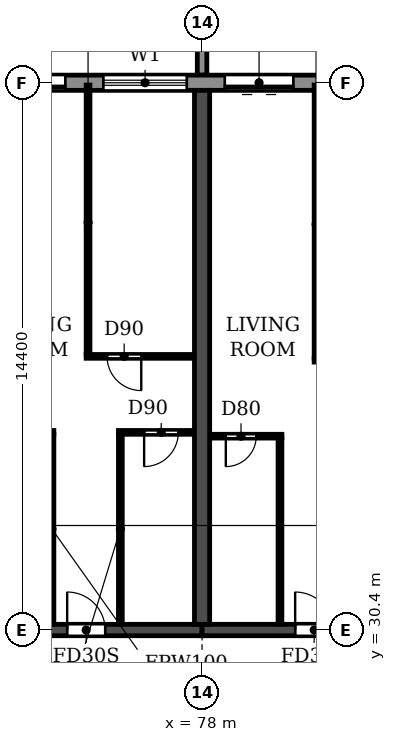
"""IFC4 building model, lengths in metres.
Left out: names, types, materials, properties, quantities, classifications, styles, units other than length and angle.
Written with IfcOpenShell. Run it as: python <this file> out.ifc"""

import sys

from ifc_helpers import new_model, si_unit, direction, frame, frame_2d, origin, place, context, subcontext, project, spatial, polyline, rectangle, outline, extrude, source, transform, mapped, element, fill, save


model = new_model("IFC4")
c1 = context("Model", 3, precision=1e-05, world=origin(), true_north=direction((0.0, 1.0)))
c2 = subcontext(c1, "Body", "Model", "MODEL_VIEW")
j1 = project(units=[si_unit("LENGTHUNIT", "METRE"), si_unit("PLANEANGLEUNIT", "RADIAN")], contexts=[c1])
p1 = place(None, origin())
s1 = spatial("IfcSite", under=j1, at=p1, CompositionType="ELEMENT")
p2 = place(p1, origin())
s2 = spatial("IfcBuilding", under=s1, at=p2, CompositionType="ELEMENT")
p3 = place(p2, frame((0.0, 0.0, 56.4)))
s3 = spatial("IfcBuildingStorey", under=s2, at=p3, CompositionType="ELEMENT", Elevation=56.4)
p4 = place(p3, frame((78.0, 30.55, 0.0), z_axis=(0.0, 0.0, 1.0), x_axis=(0.0, 1.0, 0.0)))
e1 = element("IfcWall", 1, at=p4, inside=s3, PredefinedType="SHEAR", context=c2, shape_type="SweptSolid", body=[
    extrude(rectangle(XDim=14.05, YDim=0.4, at=frame_2d((7.025, 0.0))), origin(), (0.0, 0.0, 1.0), 3.05),
])
p5 = place(p3, frame((72.0, 30.4, 0.0), z_axis=(0.0, 0.0, 1.0), x_axis=(1.0, 0.0, 0.0)))
e2 = element("IfcWall", 2, at=p5, inside=s3, PredefinedType="SHEAR", context=c2, shape_type="SweptSolid", body=[
    extrude(rectangle(XDim=6.0, YDim=0.3, at=frame_2d((3.0, 0.0))), origin(), (0.0, 0.0, 1.0), 2.45),
])
p6 = place(p5, frame((2.45, 0.0, 0.0)))
e3 = element("IfcOpeningElement", 3, at=p6, cuts=e2, PredefinedType="OPENING", context=c2, shape_type="SweptSolid", body=[
    extrude(rectangle(XDim=1.0, YDim=2.1, at=frame_2d((0.5, 1.05))), frame((0.0, 0.16, 0.0), z_axis=(0.0, -1.0, 0.0), x_axis=(1.0, 0.0, 0.0)), (0.0, 0.0, 1.0), 0.32),
])
p7 = place(p3, frame((78.0, 30.4, 0.0), z_axis=(0.0, 0.0, 1.0), x_axis=(1.0, 0.0, 0.0)))
e4 = element("IfcWall", 4, at=p7, inside=s3, PredefinedType="SHEAR", context=c2, shape_type="SweptSolid", body=[
    extrude(rectangle(XDim=6.0, YDim=0.3, at=frame_2d((3.0, 0.0))), origin(), (0.0, 0.0, 1.0), 2.45),
])
p8 = place(p7, frame((2.45, 0.0, 0.0)))
e5 = element("IfcOpeningElement", 5, at=p8, cuts=e4, PredefinedType="OPENING", context=c2, shape_type="SweptSolid", body=[
    extrude(rectangle(XDim=1.0, YDim=2.1, at=frame_2d((0.5, 1.05))), frame((0.0, 0.16, 0.0), z_axis=(0.0, -1.0, 0.0), x_axis=(1.0, 0.0, 0.0)), (0.0, 0.0, 1.0), 0.32),
])
p9 = place(p3, frame((91.317, 44.8, 0.0), z_axis=(0.0, 0.0, 1.0), x_axis=(-1.0, 0.0, 0.0)))
e6 = element("IfcWall", 6, at=p9, inside=s3, PredefinedType="STANDARD", context=c2, shape_type="SweptSolid", body=[
    extrude(rectangle(XDim=80.634, YDim=0.4, at=frame_2d((40.317, 0.0))), origin(), (0.0, 0.0, 1.0), 3.05),
])
p10 = place(p9, frame((76.717, 0.0, 0.9)))
e7 = element("IfcOpeningElement", 7, at=p10, cuts=e6, PredefinedType="OPENING", context=c2, shape_type="SweptSolid", body=[
    extrude(rectangle(XDim=2.2, YDim=1.5, at=frame_2d((1.1, 0.75))), frame((0.0, 0.21, 0.0), z_axis=(0.0, -1.0, 0.0), x_axis=(1.0, 0.0, 0.0)), (0.0, 0.0, 1.0), 0.42),
])
p11 = place(p9, frame((73.917, 0.0, 0.0)))
e8 = element("IfcOpeningElement", 8, at=p11, cuts=e6, PredefinedType="OPENING", context=c2, shape_type="SweptSolid", body=[
    extrude(rectangle(XDim=1.8, YDim=2.4, at=frame_2d((0.9, 1.2))), frame((0.0, 0.21, 0.0), z_axis=(0.0, -1.0, 0.0), x_axis=(1.0, 0.0, 0.0)), (0.0, 0.0, 1.0), 0.42),
])
p12 = place(p9, frame((70.717, 0.0, 0.9)))
e9 = element("IfcOpeningElement", 9, at=p12, cuts=e6, PredefinedType="OPENING", context=c2, shape_type="SweptSolid", body=[
    extrude(rectangle(XDim=2.2, YDim=1.5, at=frame_2d((1.1, 0.75))), frame((0.0, 0.21, 0.0), z_axis=(0.0, -1.0, 0.0), x_axis=(1.0, 0.0, 0.0)), (0.0, 0.0, 1.0), 0.42),
])
p13 = place(p9, frame((67.917, 0.0, 0.0)))
e10 = element("IfcOpeningElement", 10, at=p13, cuts=e6, PredefinedType="OPENING", context=c2, shape_type="SweptSolid", body=[
    extrude(rectangle(XDim=1.8, YDim=2.4, at=frame_2d((0.9, 1.2))), frame((0.0, 0.21, 0.0), z_axis=(0.0, -1.0, 0.0), x_axis=(1.0, 0.0, 0.0)), (0.0, 0.0, 1.0), 0.42),
])
p14 = place(p9, frame((64.717, 0.0, 0.9)))
e11 = element("IfcOpeningElement", 11, at=p14, cuts=e6, PredefinedType="OPENING", context=c2, shape_type="SweptSolid", body=[
    extrude(rectangle(XDim=2.2, YDim=1.5, at=frame_2d((1.1, 0.75))), frame((0.0, 0.21, 0.0), z_axis=(0.0, -1.0, 0.0), x_axis=(1.0, 0.0, 0.0)), (0.0, 0.0, 1.0), 0.42),
])
p15 = place(p9, frame((61.917, 0.0, 0.0)))
e12 = element("IfcOpeningElement", 12, at=p15, cuts=e6, PredefinedType="OPENING", context=c2, shape_type="SweptSolid", body=[
    extrude(rectangle(XDim=1.8, YDim=2.4, at=frame_2d((0.9, 1.2))), frame((0.0, 0.21, 0.0), z_axis=(0.0, -1.0, 0.0), x_axis=(1.0, 0.0, 0.0)), (0.0, 0.0, 1.0), 0.42),
])
p16 = place(p9, frame((58.717, 0.0, 0.9)))
e13 = element("IfcOpeningElement", 13, at=p16, cuts=e6, PredefinedType="OPENING", context=c2, shape_type="SweptSolid", body=[
    extrude(rectangle(XDim=2.2, YDim=1.5, at=frame_2d((1.1, 0.75))), frame((0.0, 0.21, 0.0), z_axis=(0.0, -1.0, 0.0), x_axis=(1.0, 0.0, 0.0)), (0.0, 0.0, 1.0), 0.42),
])
p17 = place(p9, frame((55.717, 0.0, 0.9)))
e14 = element("IfcOpeningElement", 14, at=p17, cuts=e6, PredefinedType="OPENING", context=c2, shape_type="SweptSolid", body=[
    extrude(rectangle(XDim=2.2, YDim=1.5, at=frame_2d((1.1, 0.75))), frame((0.0, 0.21, 0.0), z_axis=(0.0, -1.0, 0.0), x_axis=(1.0, 0.0, 0.0)), (0.0, 0.0, 1.0), 0.42),
])
p18 = place(p9, frame((52.917, 0.0, 0.0)))
e15 = element("IfcOpeningElement", 15, at=p18, cuts=e6, PredefinedType="OPENING", context=c2, shape_type="SweptSolid", body=[
    extrude(rectangle(XDim=1.8, YDim=2.4, at=frame_2d((0.9, 1.2))), frame((0.0, 0.21, 0.0), z_axis=(0.0, -1.0, 0.0), x_axis=(1.0, 0.0, 0.0)), (0.0, 0.0, 1.0), 0.42),
])
p19 = place(p9, frame((49.717, 0.0, 0.9)))
e16 = element("IfcOpeningElement", 16, at=p19, cuts=e6, PredefinedType="OPENING", context=c2, shape_type="SweptSolid", body=[
    extrude(rectangle(XDim=2.2, YDim=1.5, at=frame_2d((1.1, 0.75))), frame((0.0, 0.21, 0.0), z_axis=(0.0, -1.0, 0.0), x_axis=(1.0, 0.0, 0.0)), (0.0, 0.0, 1.0), 0.42),
])
p20 = place(p9, frame((46.917, 0.0, 0.0)))
e17 = element("IfcOpeningElement", 17, at=p20, cuts=e6, PredefinedType="OPENING", context=c2, shape_type="SweptSolid", body=[
    extrude(rectangle(XDim=1.8, YDim=2.4, at=frame_2d((0.9, 1.2))), frame((0.0, 0.21, 0.0), z_axis=(0.0, -1.0, 0.0), x_axis=(1.0, 0.0, 0.0)), (0.0, 0.0, 1.0), 0.42),
])
p21 = place(p9, frame((43.717, 0.0, 0.9)))
e18 = element("IfcOpeningElement", 18, at=p21, cuts=e6, PredefinedType="OPENING", context=c2, shape_type="SweptSolid", body=[
    extrude(rectangle(XDim=2.2, YDim=1.5, at=frame_2d((1.1, 0.75))), frame((0.0, 0.21, 0.0), z_axis=(0.0, -1.0, 0.0), x_axis=(1.0, 0.0, 0.0)), (0.0, 0.0, 1.0), 0.42),
])
p22 = place(p9, frame((40.717, 0.0, 0.9)))
e19 = element("IfcOpeningElement", 19, at=p22, cuts=e6, PredefinedType="OPENING", context=c2, shape_type="SweptSolid", body=[
    extrude(rectangle(XDim=2.2, YDim=1.5, at=frame_2d((1.1, 0.75))), frame((0.0, 0.21, 0.0), z_axis=(0.0, -1.0, 0.0), x_axis=(1.0, 0.0, 0.0)), (0.0, 0.0, 1.0), 0.42),
])
p23 = place(p9, frame((37.717, 0.0, 0.9)))
e20 = element("IfcOpeningElement", 20, at=p23, cuts=e6, PredefinedType="OPENING", context=c2, shape_type="SweptSolid", body=[
    extrude(rectangle(XDim=2.2, YDim=1.5, at=frame_2d((1.1, 0.75))), frame((0.0, 0.21, 0.0), z_axis=(0.0, -1.0, 0.0), x_axis=(1.0, 0.0, 0.0)), (0.0, 0.0, 1.0), 0.42),
])
p24 = place(p9, frame((34.717, 0.0, 0.9)))
e21 = element("IfcOpeningElement", 21, at=p24, cuts=e6, PredefinedType="OPENING", context=c2, shape_type="SweptSolid", body=[
    extrude(rectangle(XDim=2.2, YDim=1.5, at=frame_2d((1.1, 0.75))), frame((0.0, 0.21, 0.0), z_axis=(0.0, -1.0, 0.0), x_axis=(1.0, 0.0, 0.0)), (0.0, 0.0, 1.0), 0.42),
])
p25 = place(p9, frame((31.917, 0.0, 0.0)))
e22 = element("IfcOpeningElement", 22, at=p25, cuts=e6, PredefinedType="OPENING", context=c2, shape_type="SweptSolid", body=[
    extrude(rectangle(XDim=1.8, YDim=2.4, at=frame_2d((0.9, 1.2))), frame((0.0, 0.21, 0.0), z_axis=(0.0, -1.0, 0.0), x_axis=(1.0, 0.0, 0.0)), (0.0, 0.0, 1.0), 0.42),
])
p26 = place(p9, frame((28.917, 0.0, 0.0)))
e23 = element("IfcOpeningElement", 23, at=p26, cuts=e6, PredefinedType="OPENING", context=c2, shape_type="SweptSolid", body=[
    extrude(rectangle(XDim=1.8, YDim=2.4, at=frame_2d((0.9, 1.2))), frame((0.0, 0.21, 0.0), z_axis=(0.0, -1.0, 0.0), x_axis=(1.0, 0.0, 0.0)), (0.0, 0.0, 1.0), 0.42),
])
p27 = place(p9, frame((25.717, 0.0, 0.9)))
e24 = element("IfcOpeningElement", 24, at=p27, cuts=e6, PredefinedType="OPENING", context=c2, shape_type="SweptSolid", body=[
    extrude(rectangle(XDim=2.2, YDim=1.5, at=frame_2d((1.1, 0.75))), frame((0.0, 0.21, 0.0), z_axis=(0.0, -1.0, 0.0), x_axis=(1.0, 0.0, 0.0)), (0.0, 0.0, 1.0), 0.42),
])
p28 = place(p9, frame((22.917, 0.0, 0.0)))
e25 = element("IfcOpeningElement", 25, at=p28, cuts=e6, PredefinedType="OPENING", context=c2, shape_type="SweptSolid", body=[
    extrude(rectangle(XDim=1.8, YDim=2.4, at=frame_2d((0.9, 1.2))), frame((0.0, 0.21, 0.0), z_axis=(0.0, -1.0, 0.0), x_axis=(1.0, 0.0, 0.0)), (0.0, 0.0, 1.0), 0.42),
])
p29 = place(p9, frame((19.717, 0.0, 0.9)))
e26 = element("IfcOpeningElement", 26, at=p29, cuts=e6, PredefinedType="OPENING", context=c2, shape_type="SweptSolid", body=[
    extrude(rectangle(XDim=2.2, YDim=1.5, at=frame_2d((1.1, 0.75))), frame((0.0, 0.21, 0.0), z_axis=(0.0, -1.0, 0.0), x_axis=(1.0, 0.0, 0.0)), (0.0, 0.0, 1.0), 0.42),
])
p30 = place(p9, frame((16.917, 0.0, 0.0)))
e27 = element("IfcOpeningElement", 27, at=p30, cuts=e6, PredefinedType="OPENING", context=c2, shape_type="SweptSolid", body=[
    extrude(rectangle(XDim=1.8, YDim=2.4, at=frame_2d((0.9, 1.2))), frame((0.0, 0.21, 0.0), z_axis=(0.0, -1.0, 0.0), x_axis=(1.0, 0.0, 0.0)), (0.0, 0.0, 1.0), 0.42),
])
p31 = place(p9, frame((13.717, 0.0, 0.9)))
e28 = element("IfcOpeningElement", 28, at=p31, cuts=e6, PredefinedType="OPENING", context=c2, shape_type="SweptSolid", body=[
    extrude(rectangle(XDim=2.2, YDim=1.5, at=frame_2d((1.1, 0.75))), frame((0.0, 0.21, 0.0), z_axis=(0.0, -1.0, 0.0), x_axis=(1.0, 0.0, 0.0)), (0.0, 0.0, 1.0), 0.42),
])
p32 = place(p9, frame((10.917, 0.0, 0.0)))
e29 = element("IfcOpeningElement", 29, at=p32, cuts=e6, PredefinedType="OPENING", context=c2, shape_type="SweptSolid", body=[
    extrude(rectangle(XDim=1.8, YDim=2.4, at=frame_2d((0.9, 1.2))), frame((0.0, 0.21, 0.0), z_axis=(0.0, -1.0, 0.0), x_axis=(1.0, 0.0, 0.0)), (0.0, 0.0, 1.0), 0.42),
])
p33 = place(p9, frame((7.717, 0.0, 0.9)))
e30 = element("IfcOpeningElement", 30, at=p33, cuts=e6, PredefinedType="OPENING", context=c2, shape_type="SweptSolid", body=[
    extrude(rectangle(XDim=2.2, YDim=1.5, at=frame_2d((1.1, 0.75))), frame((0.0, 0.21, 0.0), z_axis=(0.0, -1.0, 0.0), x_axis=(1.0, 0.0, 0.0)), (0.0, 0.0, 1.0), 0.42),
])
p34 = place(p9, frame((4.717, 0.0, 0.9)))
e31 = element("IfcOpeningElement", 31, at=p34, cuts=e6, PredefinedType="OPENING", context=c2, shape_type="SweptSolid", body=[
    extrude(rectangle(XDim=2.2, YDim=1.5, at=frame_2d((1.1, 0.75))), frame((0.0, 0.21, 0.0), z_axis=(0.0, -1.0, 0.0), x_axis=(1.0, 0.0, 0.0)), (0.0, 0.0, 1.0), 0.42),
])
p35 = place(p9, frame((1.717, 0.0, 0.9)))
e32 = element("IfcOpeningElement", 32, at=p35, cuts=e6, PredefinedType="OPENING", context=c2, shape_type="SweptSolid", body=[
    extrude(rectangle(XDim=2.2, YDim=1.5, at=frame_2d((1.1, 0.75))), frame((0.0, 0.21, 0.0), z_axis=(0.0, -1.0, 0.0), x_axis=(1.0, 0.0, 0.0)), (0.0, 0.0, 1.0), 0.42),
])
m1 = source(origin(), c2, "Body", "SweptSolid", [
    extrude(outline(polyline([(0.0, 0.0), (0.25, 0.0), (0.25, 3.1), (0.0, 3.1), (0.0, 0.0)])), origin(), (0.0, 0.0, 1.0), 3.1),
])
p36 = place(p3, frame((77.875, 45.0, 0.0)))
e33 = element("IfcWall", 33, at=p36, inside=s3, PredefinedType="STANDARD", context=c2, shape_type="MappedRepresentation", body=[
    mapped(m1, transform((0.0, 0.0, 0.0))),
])
p37 = place(p3, frame((78.21, 35.5, 0.0), z_axis=(0.0, 0.0, 1.0), x_axis=(1.0, 0.0, 0.0)))
e34 = element("IfcWall", 34, at=p37, inside=s3, PredefinedType="PARTITIONING", context=c2, shape_type="SweptSolid", body=[
    extrude(rectangle(XDim=1.89, YDim=0.1, at=frame_2d((0.945, 0.0))), origin(), (0.0, 0.0, 1.0), 3.05),
])
p38 = place(p37, frame((0.415, 0.0, 0.0)))
e35 = element("IfcOpeningElement", 35, at=p38, cuts=e34, PredefinedType="OPENING", context=c2, shape_type="SweptSolid", body=[
    extrude(rectangle(XDim=0.8, YDim=2.1, at=frame_2d((0.4, 1.05))), frame((0.0, 0.06, 0.0), z_axis=(0.0, -1.0, 0.0), x_axis=(1.0, 0.0, 0.0)), (0.0, 0.0, 1.0), 0.12),
])
p39 = place(p3, frame((72.21, 35.6, 0.0), z_axis=(0.0, 0.0, 1.0), x_axis=(1.0, 0.0, 0.0)))
e36 = element("IfcWall", 36, at=p39, inside=s3, PredefinedType="PARTITIONING", context=c2, shape_type="SweptSolid", body=[
    extrude(rectangle(XDim=1.89, YDim=0.1, at=frame_2d((0.945, 0.0))), origin(), (0.0, 0.0, 1.0), 3.05),
])
p40 = place(p39, frame((0.415, 0.0, 0.0)))
e37 = element("IfcOpeningElement", 37, at=p40, cuts=e36, PredefinedType="OPENING", context=c2, shape_type="SweptSolid", body=[
    extrude(rectangle(XDim=0.8, YDim=2.1, at=frame_2d((0.4, 1.05))), frame((0.0, 0.06, 0.0), z_axis=(0.0, -1.0, 0.0), x_axis=(1.0, 0.0, 0.0)), (0.0, 0.0, 1.0), 0.12),
])
p41 = place(p3, frame((75.8, 35.6, 0.0), z_axis=(0.0, 0.0, 1.0), x_axis=(1.0, 0.0, 0.0)))
e38 = element("IfcWall", 38, at=p41, inside=s3, PredefinedType="PARTITIONING", context=c2, shape_type="SweptSolid", body=[
    extrude(rectangle(XDim=1.99, YDim=0.1, at=frame_2d((0.995, 0.0))), origin(), (0.0, 0.0, 1.0), 3.05),
])
p42 = place(p41, frame((0.675, 0.0, 0.0)))
e39 = element("IfcOpeningElement", 39, at=p42, cuts=e38, PredefinedType="OPENING", context=c2, shape_type="SweptSolid", body=[
    extrude(rectangle(XDim=0.9, YDim=2.1, at=frame_2d((0.45, 1.05))), frame((0.0, 0.06, 0.0), z_axis=(0.0, -1.0, 0.0), x_axis=(1.0, 0.0, 0.0)), (0.0, 0.0, 1.0), 0.12),
])
p43 = place(p3, frame((80.95, 37.5, 0.0), z_axis=(0.0, 0.0, 1.0), x_axis=(1.0, 0.0, 0.0)))
e40 = element("IfcWall", 40, at=p43, inside=s3, PredefinedType="PARTITIONING", context=c2, shape_type="SweptSolid", body=[
    extrude(rectangle(XDim=2.84, YDim=0.1, at=frame_2d((1.42, 0.0))), origin(), (0.0, 0.0, 1.0), 3.05),
])
p44 = place(p43, frame((1.65, 0.0, 0.0)))
e41 = element("IfcOpeningElement", 41, at=p44, cuts=e40, PredefinedType="OPENING", context=c2, shape_type="SweptSolid", body=[
    extrude(rectangle(XDim=0.9, YDim=2.1, at=frame_2d((0.45, 1.05))), frame((0.0, 0.06, 0.0), z_axis=(0.0, -1.0, 0.0), x_axis=(1.0, 0.0, 0.0)), (0.0, 0.0, 1.0), 0.12),
])
p45 = place(p3, frame((74.95, 37.6, 0.0), z_axis=(0.0, 0.0, 1.0), x_axis=(1.0, 0.0, 0.0)))
e42 = element("IfcWall", 42, at=p45, inside=s3, PredefinedType="PARTITIONING", context=c2, shape_type="SweptSolid", body=[
    extrude(rectangle(XDim=2.84, YDim=0.1, at=frame_2d((1.42, 0.0))), origin(), (0.0, 0.0, 1.0), 3.05),
])
p46 = place(p45, frame((0.55, 0.0, 0.0)))
e43 = element("IfcOpeningElement", 43, at=p46, cuts=e42, PredefinedType="OPENING", context=c2, shape_type="SweptSolid", body=[
    extrude(rectangle(XDim=0.9, YDim=2.1, at=frame_2d((0.45, 1.05))), frame((0.0, 0.06, 0.0), z_axis=(0.0, -1.0, 0.0), x_axis=(1.0, 0.0, 0.0)), (0.0, 0.0, 1.0), 0.12),
])
p47 = place(p3, frame((74.05, 30.56, 0.0), z_axis=(0.0, 0.0, 1.0), x_axis=(0.0, 1.0, 0.0)))
e44 = element("IfcWall", 44, at=p47, inside=s3, PredefinedType="PARTITIONING", context=c2, shape_type="SweptSolid", body=[
    extrude(rectangle(XDim=4.99, YDim=0.1, at=frame_2d((2.495, 0.0))), origin(), (0.0, 0.0, 1.0), 3.05),
])
p48 = place(p3, frame((75.0, 37.65, 0.0), z_axis=(0.0, 0.0, 1.0), x_axis=(0.0, 1.0, 0.0)))
e45 = element("IfcWall", 45, at=p48, inside=s3, PredefinedType="PARTITIONING", context=c2, shape_type="SweptSolid", body=[
    extrude(rectangle(XDim=7.09, YDim=0.1, at=frame_2d((3.545, 0.0))), origin(), (0.0, 0.0, 1.0), 3.05),
])
p49 = place(p3, frame((75.85, 30.56, 0.0), z_axis=(0.0, 0.0, 1.0), x_axis=(0.0, 1.0, 0.0)))
e46 = element("IfcWall", 46, at=p49, inside=s3, PredefinedType="PARTITIONING", context=c2, shape_type="SweptSolid", body=[
    extrude(rectangle(XDim=4.99, YDim=0.1, at=frame_2d((2.495, 0.0))), origin(), (0.0, 0.0, 1.0), 3.05),
])
p50 = place(p3, frame((80.05, 30.56, 0.0), z_axis=(0.0, 0.0, 1.0), x_axis=(0.0, 1.0, 0.0)))
e47 = element("IfcWall", 47, at=p50, inside=s3, PredefinedType="PARTITIONING", context=c2, shape_type="SweptSolid", body=[
    extrude(rectangle(XDim=4.89, YDim=0.1, at=frame_2d((2.445, 0.0))), origin(), (0.0, 0.0, 1.0), 3.05),
])
p51 = place(p3, frame((81.0, 37.55, 0.0), z_axis=(0.0, 0.0, 1.0), x_axis=(0.0, 1.0, 0.0)))
e48 = element("IfcWall", 48, at=p51, inside=s3, PredefinedType="PARTITIONING", context=c2, shape_type="SweptSolid", body=[
    extrude(rectangle(XDim=7.19, YDim=0.1, at=frame_2d((3.595, 0.0))), origin(), (0.0, 0.0, 1.0), 3.05),
])
p52 = place(p30, origin())
e49 = element("IfcDoor", 49, at=p52, inside=s3, OperationType="DOUBLE_DOOR_SLIDING", PredefinedType="DOOR", context=c2, shape_type="SweptSolid", body=[
    extrude(rectangle(XDim=1.8, YDim=2.4, at=frame_2d((0.9, 1.2))), frame((0.0, 0.025, 0.0), z_axis=(0.0, -1.0, 0.0), x_axis=(1.0, 0.0, 0.0)), (0.0, 0.0, 1.0), 0.05),
])
fill(e27, e49)
p53 = place(p31, origin())
e50 = element("IfcWindow", 50, at=p53, inside=s3, PartitioningType="DOUBLE_PANEL_HORIZONTAL", PredefinedType="WINDOW", context=c2, shape_type="SweptSolid", body=[
    extrude(rectangle(XDim=2.2, YDim=1.5, at=frame_2d((1.1, 0.75))), frame((0.0, 0.03, 0.0), z_axis=(0.0, -1.0, 0.0), x_axis=(1.0, 0.0, 0.0)), (0.0, 0.0, 1.0), 0.06),
])
fill(e28, e50)
p54 = place(p32, origin())
e51 = element("IfcDoor", 51, at=p54, inside=s3, OperationType="DOUBLE_DOOR_SLIDING", PredefinedType="DOOR", context=c2, shape_type="SweptSolid", body=[
    extrude(rectangle(XDim=1.8, YDim=2.4, at=frame_2d((0.9, 1.2))), frame((0.0, 0.025, 0.0), z_axis=(0.0, -1.0, 0.0), x_axis=(1.0, 0.0, 0.0)), (0.0, 0.0, 1.0), 0.05),
])
fill(e29, e51)
p55 = place(p6, origin())
e52 = element("IfcDoor", 52, at=p55, inside=s3, OperationType="SINGLE_SWING_LEFT", PredefinedType="DOOR", context=c2, shape_type="SweptSolid", body=[
    extrude(rectangle(XDim=1.0, YDim=2.1, at=frame_2d((0.5, 1.05))), frame((0.0, 0.025, 0.0), z_axis=(0.0, -1.0, 0.0), x_axis=(1.0, 0.0, 0.0)), (0.0, 0.0, 1.0), 0.05),
])
fill(e3, e52)
p56 = place(p46, frame((0.9, 0.0, 0.0), z_axis=(0.0, 0.0, 1.0), x_axis=(-1.0, 0.0, 0.0)))
e53 = element("IfcDoor", 53, at=p56, inside=s3, OperationType="SINGLE_SWING_LEFT", PredefinedType="DOOR", context=c2, shape_type="SweptSolid", body=[
    extrude(rectangle(XDim=0.9, YDim=2.1, at=frame_2d((0.45, 1.05))), frame((0.0, 0.025, 0.0), z_axis=(0.0, -1.0, 0.0), x_axis=(1.0, 0.0, 0.0)), (0.0, 0.0, 1.0), 0.05),
])
fill(e43, e53)
p57 = place(p42, frame((0.9, 0.0, 0.0), z_axis=(0.0, 0.0, 1.0), x_axis=(-1.0, 0.0, 0.0)))
e54 = element("IfcDoor", 54, at=p57, inside=s3, OperationType="SINGLE_SWING_RIGHT", PredefinedType="DOOR", context=c2, shape_type="SweptSolid", body=[
    extrude(rectangle(XDim=0.9, YDim=2.1, at=frame_2d((0.45, 1.05))), frame((0.0, 0.025, 0.0), z_axis=(0.0, -1.0, 0.0), x_axis=(1.0, 0.0, 0.0)), (0.0, 0.0, 1.0), 0.05),
])
fill(e39, e54)
p58 = place(p38, frame((0.8, 0.0, 0.0), z_axis=(0.0, 0.0, 1.0), x_axis=(-1.0, 0.0, 0.0)))
e55 = element("IfcDoor", 55, at=p58, inside=s3, OperationType="SINGLE_SWING_RIGHT", PredefinedType="DOOR", context=c2, shape_type="SweptSolid", body=[
    extrude(rectangle(XDim=0.8, YDim=2.1, at=frame_2d((0.4, 1.05))), frame((0.0, 0.025, 0.0), z_axis=(0.0, -1.0, 0.0), x_axis=(1.0, 0.0, 0.0)), (0.0, 0.0, 1.0), 0.05),
])
fill(e35, e55)
p59 = place(p8, origin())
e56 = element("IfcDoor", 56, at=p59, inside=s3, OperationType="SINGLE_SWING_LEFT", PredefinedType="DOOR", context=c2, shape_type="SweptSolid", body=[
    extrude(rectangle(XDim=1.0, YDim=2.1, at=frame_2d((0.5, 1.05))), frame((0.0, 0.025, 0.0), z_axis=(0.0, -1.0, 0.0), x_axis=(1.0, 0.0, 0.0)), (0.0, 0.0, 1.0), 0.05),
])
fill(e5, e56)
save(model, sys.argv[1])
